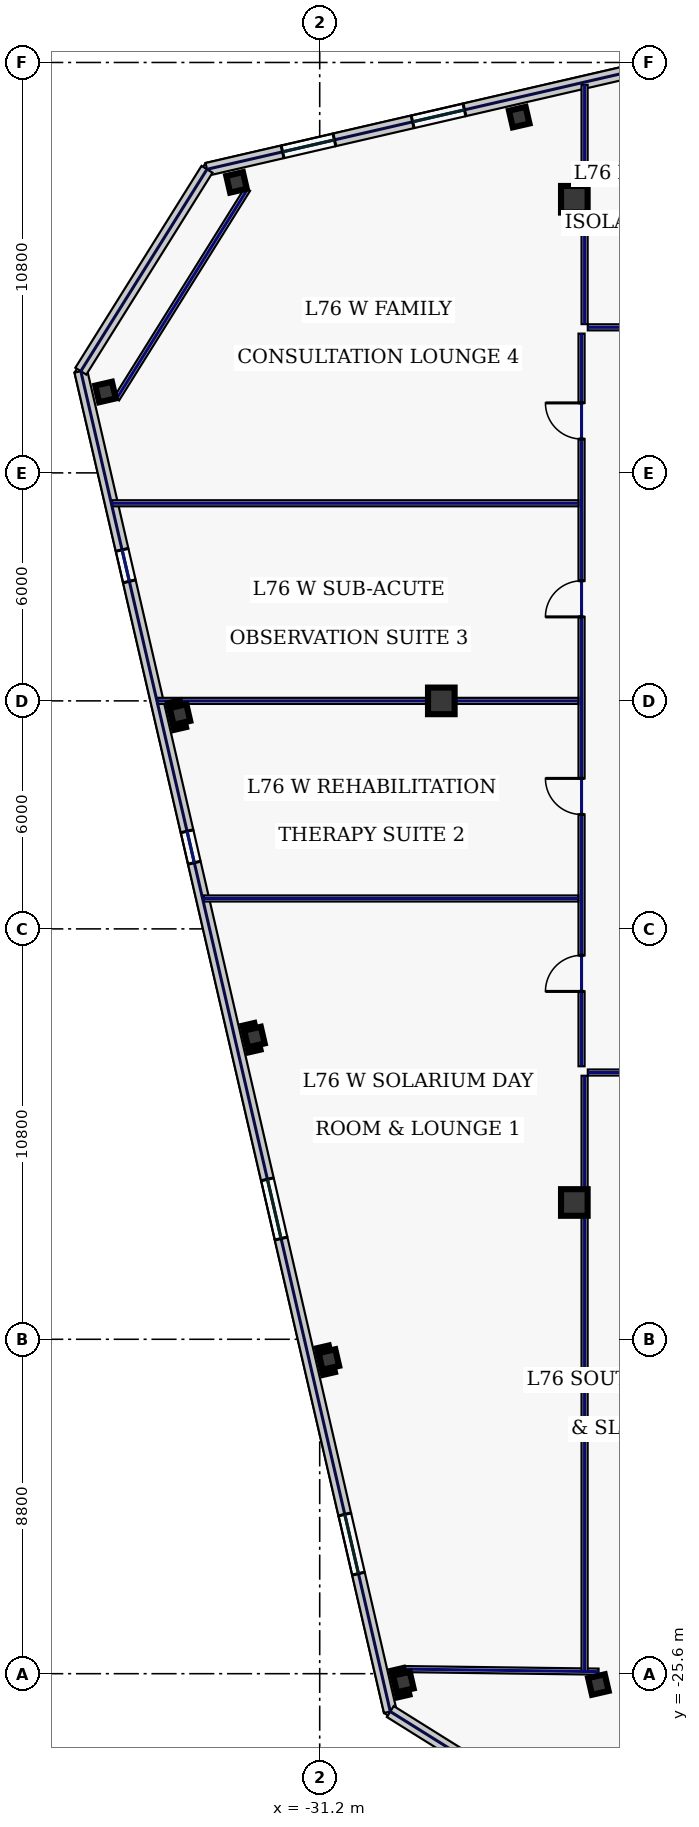
"""IFC4 building model, lengths in metres.
Left out: names, types, materials, properties, quantities, classifications, styles, units other than length and angle.
Written with IfcOpenShell. Run it as: python <this file> out.ifc"""

import sys

from ifc_helpers import new_model, si_unit, direction, frame, frame_2d, origin, origin_2d, place, context, subcontext, project, spatial, rectangle, hollow_rectangle, extrude, element, fill, save


model = new_model("IFC4")
c1 = context("Model", 3, precision=1e-05, world=origin(), true_north=direction((0.0, 1.0)))
c2 = subcontext(c1, "Body", "Model", "MODEL_VIEW")
j1 = project(units=[si_unit("LENGTHUNIT", "METRE"), si_unit("PLANEANGLEUNIT", "RADIAN")], contexts=[c1])
p1 = place(None, origin())
s1 = spatial("IfcSite", under=j1, at=p1, CompositionType="ELEMENT")
p2 = place(p1, origin())
s2 = spatial("IfcBuilding", under=s1, at=p2, CompositionType="ELEMENT")
p3 = place(p2, frame((0.0, 0.0, 325.0)))
s3 = spatial("IfcBuildingStorey", under=s2, at=p3, CompositionType="ELEMENT", Elevation=325.0)
for number, where, z_axis, x_axis in (
    (1, (-24.5, -13.2, 0.0), (0.0, 0.0, 1.0), (1.0, 0.0, 0.0)),
    (2, (-24.5, 13.2, 0.0), (0.0, 0.0, 1.0), (1.0, 0.0, 0.0)),
    (3, (-28.0, 0.0, 0.0), (0.0, 0.0, 1.0), (1.0, 0.0, 0.0)),
):
    element("IfcColumn", number, at=place(p3, frame(where, z_axis=z_axis, x_axis=x_axis)), inside=s3, PredefinedType="COLUMN", context=c2, shape_type="SweptSolid", body=[
        extrude(hollow_rectangle(XDim=0.7, YDim=0.7, WallThickness=0.032, at=origin_2d()), origin(), (0.0, 0.0, 1.0), 3.74),
    ])
for number, where, z_axis, x_axis in (
    (4, (-23.867, -25.886, 0.0), (0.0, 0.0, 1.0), (0.974, 0.225, 0.0)),
    (5, (-25.95, 15.362, 0.0), (0.0, 0.0, 1.0), (0.974, 0.225, 0.0)),
    (6, (-33.389, 13.645, 0.0), (0.0, 0.0, 1.0), (0.974, 0.225, 0.0)),
    (7, (-36.836, 8.128, 0.0), (0.0, 0.0, 1.0), (0.974, 0.225, 0.0)),
    (8, (-34.877, -0.359, 0.0), (0.0, 0.0, 1.0), (0.974, 0.225, 0.0)),
    (9, (-32.917, -8.845, 0.0), (0.0, 0.0, 1.0), (0.974, 0.225, 0.0)),
    (10, (-30.958, -17.332, 0.0), (0.0, 0.0, 1.0), (0.974, 0.225, 0.0)),
    (11, (-28.999, -25.819, 0.0), (0.0, 0.0, 1.0), (0.974, 0.225, 0.0)),
):
    element("IfcColumn", number, at=place(p3, frame(where, z_axis=z_axis, x_axis=x_axis)), inside=s3, PredefinedType="COLUMN", context=c2, shape_type="SweptSolid", body=[
        extrude(hollow_rectangle(XDim=0.45, YDim=0.45, WallThickness=0.022, at=origin_2d()), origin(), (0.0, 0.0, 1.0), 3.74),
    ])
p4 = place(p3, frame((-24.03, -29.916, 0.0), z_axis=(0.0, 0.0, 1.0), x_axis=(0.974370978061, 0.224947098473, 0.0)))
e12 = element("IfcWall", 12, at=p4, inside=s3, PredefinedType="STANDARD", context=c2, shape_type="SweptSolid", body=[
    extrude(rectangle(XDim=17.506, YDim=0.34, at=frame_2d((8.753, 0.0))), origin(), (0.0, 0.0, 1.0), 3.74),
])
p5 = place(p4, frame((2.35, 0.0, 0.9)))
e13 = element("IfcOpeningElement", 13, at=p5, cuts=e12, PredefinedType="OPENING", context=c2, shape_type="SweptSolid", body=[
    extrude(rectangle(XDim=1.5, YDim=2.0, at=frame_2d((0.75, 1.0))), frame((0.0, 0.18, 0.0), z_axis=(0.0, -1.0, 0.0), x_axis=(1.0, 0.0, 0.0)), (0.0, 0.0, 1.0), 0.36),
])
p6 = place(p4, frame((5.817, 0.0, 0.9)))
e14 = element("IfcOpeningElement", 14, at=p6, cuts=e12, PredefinedType="OPENING", context=c2, shape_type="SweptSolid", body=[
    extrude(rectangle(XDim=1.5, YDim=2.0, at=frame_2d((0.75, 1.0))), frame((0.0, 0.18, 0.0), z_axis=(0.0, -1.0, 0.0), x_axis=(1.0, 0.0, 0.0)), (0.0, 0.0, 1.0), 0.36),
])
p7 = place(p4, frame((9.886, 0.0, 0.9)))
e15 = element("IfcOpeningElement", 15, at=p7, cuts=e12, PredefinedType="OPENING", context=c2, shape_type="SweptSolid", body=[
    extrude(rectangle(XDim=1.5, YDim=2.0, at=frame_2d((0.75, 1.0))), frame((0.0, 0.18, 0.0), z_axis=(0.0, -1.0, 0.0), x_axis=(1.0, 0.0, 0.0)), (0.0, 0.0, 1.0), 0.36),
])
p8 = place(p4, frame((13.353, 0.0, 0.9)))
e16 = element("IfcOpeningElement", 16, at=p8, cuts=e12, PredefinedType="OPENING", context=c2, shape_type="SweptSolid", body=[
    extrude(rectangle(XDim=1.5, YDim=2.0, at=frame_2d((0.75, 1.0))), frame((0.0, 0.18, 0.0), z_axis=(0.0, -1.0, 0.0), x_axis=(1.0, 0.0, 0.0)), (0.0, 0.0, 1.0), 0.36),
])
p9 = place(p3, frame((-17.245, 17.895, 0.0), z_axis=(0.0, 0.0, 1.0), x_axis=(-0.97437318493, -0.224937539085, 0.0)))
e17 = element("IfcWall", 17, at=p9, inside=s3, PredefinedType="STANDARD", context=c2, shape_type="SweptSolid", body=[
    extrude(rectangle(XDim=17.366, YDim=0.34, at=frame_2d((8.683, 0.0))), origin(), (0.0, 0.0, 1.0), 3.74),
])
p10 = place(p9, frame((13.925, 0.0, 1.0)))
e18 = element("IfcOpeningElement", 18, at=p10, cuts=e17, PredefinedType="OPENING", context=c2, shape_type="SweptSolid", body=[
    extrude(rectangle(XDim=1.4, YDim=1.85, at=frame_2d((0.7, 0.925))), frame((0.0, 0.18, 0.0), z_axis=(0.0, -1.0, 0.0), x_axis=(1.0, 0.0, 0.0)), (0.0, 0.0, 1.0), 0.36),
])
p11 = place(p9, frame((10.413, 0.0, 1.0)))
e19 = element("IfcOpeningElement", 19, at=p11, cuts=e17, PredefinedType="OPENING", context=c2, shape_type="SweptSolid", body=[
    extrude(rectangle(XDim=1.4, YDim=1.85, at=frame_2d((0.7, 0.925))), frame((0.0, 0.18, 0.0), z_axis=(0.0, -1.0, 0.0), x_axis=(1.0, 0.0, 0.0)), (0.0, 0.0, 1.0), 0.36),
])
p12 = place(p9, frame((3.329, 0.0, 1.0)))
e20 = element("IfcOpeningElement", 20, at=p12, cuts=e17, PredefinedType="OPENING", context=c2, shape_type="SweptSolid", body=[
    extrude(rectangle(XDim=0.85, YDim=1.85, at=frame_2d((0.425, 0.925))), frame((0.0, 0.18, 0.0), z_axis=(0.0, -1.0, 0.0), x_axis=(1.0, 0.0, 0.0)), (0.0, 0.0, 1.0), 0.36),
])
p13 = place(p3, frame((-37.486, 8.676, 0.0), z_axis=(0.0, 0.0, 1.0), x_axis=(0.224953091034, -0.974369594576, 0.0)))
e21 = element("IfcWall", 21, at=p13, inside=s3, PredefinedType="STANDARD", context=c2, shape_type="SweptSolid", body=[
    extrude(rectangle(XDim=36.2, YDim=0.34, at=frame_2d((18.1, 0.0))), origin(), (0.0, 0.0, 1.0), 3.74),
])
p14 = place(p13, frame((4.825, 0.0, 0.75)))
e22 = element("IfcOpeningElement", 22, at=p14, cuts=e21, PredefinedType="OPENING", context=c2, shape_type="SweptSolid", body=[
    extrude(rectangle(XDim=0.85, YDim=1.85, at=frame_2d((0.425, 0.925))), frame((0.0, 0.18, 0.0), z_axis=(0.0, -1.0, 0.0), x_axis=(1.0, 0.0, 0.0)), (0.0, 0.0, 1.0), 0.36),
])
p15 = place(p13, frame((12.425, 0.0, 0.75)))
e23 = element("IfcOpeningElement", 23, at=p15, cuts=e21, PredefinedType="OPENING", context=c2, shape_type="SweptSolid", body=[
    extrude(rectangle(XDim=0.85, YDim=1.85, at=frame_2d((0.425, 0.925))), frame((0.0, 0.18, 0.0), z_axis=(0.0, -1.0, 0.0), x_axis=(1.0, 0.0, 0.0)), (0.0, 0.0, 1.0), 0.36),
])
p16 = place(p13, frame((21.825, 0.0, 0.58)))
e24 = element("IfcOpeningElement", 24, at=p16, cuts=e21, PredefinedType="OPENING", context=c2, shape_type="SweptSolid", body=[
    extrude(rectangle(XDim=1.6, YDim=2.3, at=frame_2d((0.8, 1.15))), frame((0.0, 0.18, 0.0), z_axis=(0.0, -1.0, 0.0), x_axis=(1.0, 0.0, 0.0)), (0.0, 0.0, 1.0), 0.36),
])
p17 = place(p13, frame((30.875, 0.0, 0.58)))
e25 = element("IfcOpeningElement", 25, at=p17, cuts=e21, PredefinedType="OPENING", context=c2, shape_type="SweptSolid", body=[
    extrude(rectangle(XDim=1.6, YDim=2.3, at=frame_2d((0.8, 1.15))), frame((0.0, 0.18, 0.0), z_axis=(0.0, -1.0, 0.0), x_axis=(1.0, 0.0, 0.0)), (0.0, 0.0, 1.0), 0.36),
])
for number, where, z_axis, x_axis in (
    (26, (-34.166, 13.989, 0.0), (0.0, 0.0, 1.0), (-0.53, -0.848, 0.0)),
    (27, (-29.343, -26.596, 0.0), (0.0, 0.0, 1.0), (0.848, -0.53, 0.0)),
):
    element("IfcWall", number, at=place(p3, frame(where, z_axis=z_axis, x_axis=x_axis)), inside=s3, PredefinedType="STANDARD", context=c2, shape_type="SweptSolid", body=[
        extrude(rectangle(XDim=6.265, YDim=0.34, at=frame_2d((3.133, 0.0))), origin(), (0.0, 0.0, 1.0), 3.74),
    ])
p18 = place(p3, frame((-33.1, 13.465, 0.0), z_axis=(0.0, 0.0, 1.0), x_axis=(-0.529958457806, -0.848023604035, 0.0)))
e28 = element("IfcWall", 28, at=p18, inside=s3, PredefinedType="PARTITIONING", context=c2, shape_type="SweptSolid", body=[
    extrude(rectangle(XDim=6.505, YDim=0.16, at=frame_2d((3.252, 0.0))), origin(), (0.0, 0.0, 1.0), 3.74),
])
p19 = place(p3, frame((-28.994, -25.479, 0.0), z_axis=(0.0, 0.0, 1.0), x_axis=(0.999915052546, -0.01303409726, 0.0)))
e29 = element("IfcWall", 29, at=p19, inside=s3, PredefinedType="PARTITIONING", context=c2, shape_type="SweptSolid", body=[
    extrude(rectangle(XDim=5.132, YDim=0.16, at=frame_2d((2.566, 0.0))), origin(), (0.0, 0.0, 1.0), 3.74),
])
p20 = place(p3, frame((-24.31, -9.615, 0.0), z_axis=(0.0, 0.0, 1.0), x_axis=(0.0, 1.0, 0.0)))
e30 = element("IfcWall", 30, at=p20, inside=s3, PredefinedType="PARTITIONING", context=c2, shape_type="SweptSolid", body=[
    extrude(rectangle(XDim=19.28, YDim=0.16, at=frame_2d((9.64, 0.0))), origin(), (0.0, 0.0, 1.0), 3.74),
])
p21 = place(p20, frame((1.969, 0.0, 0.0)))
e31 = element("IfcOpeningElement", 31, at=p21, cuts=e30, PredefinedType="OPENING", context=c2, shape_type="SweptSolid", body=[
    extrude(rectangle(XDim=0.95, YDim=2.2, at=frame_2d((0.475, 1.1))), frame((0.0, 0.09, 0.0), z_axis=(0.0, -1.0, 0.0), x_axis=(1.0, 0.0, 0.0)), (0.0, 0.0, 1.0), 0.18),
])
p22 = place(p20, frame((6.625, 0.0, 0.0)))
e32 = element("IfcOpeningElement", 32, at=p22, cuts=e30, PredefinedType="OPENING", context=c2, shape_type="SweptSolid", body=[
    extrude(rectangle(XDim=0.95, YDim=2.2, at=frame_2d((0.475, 1.1))), frame((0.0, 0.09, 0.0), z_axis=(0.0, -1.0, 0.0), x_axis=(1.0, 0.0, 0.0)), (0.0, 0.0, 1.0), 0.18),
])
p23 = place(p20, frame((11.825, 0.0, 0.0)))
e33 = element("IfcOpeningElement", 33, at=p23, cuts=e30, PredefinedType="OPENING", context=c2, shape_type="SweptSolid", body=[
    extrude(rectangle(XDim=0.95, YDim=2.2, at=frame_2d((0.475, 1.1))), frame((0.0, 0.09, 0.0), z_axis=(0.0, -1.0, 0.0), x_axis=(1.0, 0.0, 0.0)), (0.0, 0.0, 1.0), 0.18),
])
p24 = place(p20, frame((16.506, 0.0, 0.0)))
e34 = element("IfcOpeningElement", 34, at=p24, cuts=e30, PredefinedType="OPENING", context=c2, shape_type="SweptSolid", body=[
    extrude(rectangle(XDim=0.95, YDim=2.2, at=frame_2d((0.475, 1.1))), frame((0.0, 0.09, 0.0), z_axis=(0.0, -1.0, 0.0), x_axis=(1.0, 0.0, 0.0)), (0.0, 0.0, 1.0), 0.18),
])
p25 = place(p3, frame((-24.145, 9.83, 0.0), z_axis=(0.0, 0.0, 1.0), x_axis=(1.0, 0.0, 0.0)))
e35 = element("IfcWall", 35, at=p25, inside=s3, PredefinedType="PARTITIONING", context=c2, shape_type="SweptSolid", body=[
    extrude(rectangle(XDim=48.29, YDim=0.16, at=frame_2d((24.145, 0.0))), origin(), (0.0, 0.0, 1.0), 3.74),
])
p26 = place(p25, frame((1.869, 0.0, 0.0)))
e36 = element("IfcOpeningElement", 36, at=p26, cuts=e35, PredefinedType="OPENING", context=c2, shape_type="SweptSolid", body=[
    extrude(rectangle(XDim=1.3, YDim=2.2, at=frame_2d((0.65, 1.1))), frame((0.0, 0.09, 0.0), z_axis=(0.0, -1.0, 0.0), x_axis=(1.0, 0.0, 0.0)), (0.0, 0.0, 1.0), 0.18),
])
p27 = place(p25, frame((6.24, 0.0, 0.0)))
e37 = element("IfcOpeningElement", 37, at=p27, cuts=e35, PredefinedType="OPENING", context=c2, shape_type="SweptSolid", body=[
    extrude(rectangle(XDim=1.3, YDim=2.2, at=frame_2d((0.65, 1.1))), frame((0.0, 0.09, 0.0), z_axis=(0.0, -1.0, 0.0), x_axis=(1.0, 0.0, 0.0)), (0.0, 0.0, 1.0), 0.18),
])
p28 = place(p25, frame((12.405, 0.0, 0.0)))
e38 = element("IfcOpeningElement", 38, at=p28, cuts=e35, PredefinedType="OPENING", context=c2, shape_type="SweptSolid", body=[
    extrude(rectangle(XDim=0.95, YDim=2.2, at=frame_2d((0.475, 1.1))), frame((0.0, 0.09, 0.0), z_axis=(0.0, -1.0, 0.0), x_axis=(1.0, 0.0, 0.0)), (0.0, 0.0, 1.0), 0.18),
])
p29 = place(p25, frame((20.28, 0.0, 0.0)))
e39 = element("IfcOpeningElement", 39, at=p29, cuts=e35, PredefinedType="OPENING", context=c2, shape_type="SweptSolid", body=[
    extrude(rectangle(XDim=1.3, YDim=2.2, at=frame_2d((0.65, 1.1))), frame((0.0, 0.09, 0.0), z_axis=(0.0, -1.0, 0.0), x_axis=(1.0, 0.0, 0.0)), (0.0, 0.0, 1.0), 0.18),
])
p30 = place(p25, frame((29.055, 0.0, 0.0)))
e40 = element("IfcOpeningElement", 40, at=p30, cuts=e35, PredefinedType="OPENING", context=c2, shape_type="SweptSolid", body=[
    extrude(rectangle(XDim=1.05, YDim=2.2, at=frame_2d((0.525, 1.1))), frame((0.0, 0.09, 0.0), z_axis=(0.0, -1.0, 0.0), x_axis=(1.0, 0.0, 0.0)), (0.0, 0.0, 1.0), 0.18),
])
p31 = place(p25, frame((37.605, 0.0, 0.0)))
e41 = element("IfcOpeningElement", 41, at=p31, cuts=e35, PredefinedType="OPENING", context=c2, shape_type="SweptSolid", body=[
    extrude(rectangle(XDim=0.95, YDim=2.2, at=frame_2d((0.475, 1.1))), frame((0.0, 0.09, 0.0), z_axis=(0.0, -1.0, 0.0), x_axis=(1.0, 0.0, 0.0)), (0.0, 0.0, 1.0), 0.18),
])
p32 = place(p25, frame((44.726, 0.0, 0.0)))
e42 = element("IfcOpeningElement", 42, at=p32, cuts=e35, PredefinedType="OPENING", context=c2, shape_type="SweptSolid", body=[
    extrude(rectangle(XDim=0.95, YDim=2.2, at=frame_2d((0.475, 1.1))), frame((0.0, 0.09, 0.0), z_axis=(0.0, -1.0, 0.0), x_axis=(1.0, 0.0, 0.0)), (0.0, 0.0, 1.0), 0.18),
])
p33 = place(p3, frame((12.535, -9.78, 0.0), z_axis=(0.0, 0.0, 1.0), x_axis=(-1.0, 0.0, 0.0)))
e43 = element("IfcWall", 43, at=p33, inside=s3, PredefinedType="PARTITIONING", context=c2, shape_type="SweptSolid", body=[
    extrude(rectangle(XDim=36.68, YDim=0.16, at=frame_2d((18.34, 0.0))), origin(), (0.0, 0.0, 1.0), 3.74),
])
p34 = place(p33, frame((33.856, 0.0, 0.0)))
e44 = element("IfcOpeningElement", 44, at=p34, cuts=e43, PredefinedType="OPENING", context=c2, shape_type="SweptSolid", body=[
    extrude(rectangle(XDim=1.15, YDim=2.2, at=frame_2d((0.575, 1.1))), frame((0.0, 0.09, 0.0), z_axis=(0.0, -1.0, 0.0), x_axis=(1.0, 0.0, 0.0)), (0.0, 0.0, 1.0), 0.18),
])
p35 = place(p33, frame((29.535, 0.0, 0.0)))
e45 = element("IfcOpeningElement", 45, at=p35, cuts=e43, PredefinedType="OPENING", context=c2, shape_type="SweptSolid", body=[
    extrude(rectangle(XDim=0.95, YDim=2.2, at=frame_2d((0.475, 1.1))), frame((0.0, 0.09, 0.0), z_axis=(0.0, -1.0, 0.0), x_axis=(1.0, 0.0, 0.0)), (0.0, 0.0, 1.0), 0.18),
])
p36 = place(p33, frame((23.555, 0.0, 0.0)))
e46 = element("IfcOpeningElement", 46, at=p36, cuts=e43, PredefinedType="OPENING", context=c2, shape_type="SweptSolid", body=[
    extrude(rectangle(XDim=1.05, YDim=2.2, at=frame_2d((0.525, 1.1))), frame((0.0, 0.09, 0.0), z_axis=(0.0, -1.0, 0.0), x_axis=(1.0, 0.0, 0.0)), (0.0, 0.0, 1.0), 0.18),
])
p37 = place(p33, frame((16.425, 0.0, 0.0)))
e47 = element("IfcOpeningElement", 47, at=p37, cuts=e43, PredefinedType="OPENING", context=c2, shape_type="SweptSolid", body=[
    extrude(rectangle(XDim=0.95, YDim=2.2, at=frame_2d((0.475, 1.1))), frame((0.0, 0.09, 0.0), z_axis=(0.0, -1.0, 0.0), x_axis=(1.0, 0.0, 0.0)), (0.0, 0.0, 1.0), 0.18),
])
p38 = place(p33, frame((9.385, 0.0, 0.0)))
e48 = element("IfcOpeningElement", 48, at=p38, cuts=e43, PredefinedType="OPENING", context=c2, shape_type="SweptSolid", body=[
    extrude(rectangle(XDim=0.95, YDim=2.2, at=frame_2d((0.475, 1.1))), frame((0.0, 0.09, 0.0), z_axis=(0.0, -1.0, 0.0), x_axis=(1.0, 0.0, 0.0)), (0.0, 0.0, 1.0), 0.18),
])
p39 = place(p33, frame((2.624, 0.0, 0.0)))
e49 = element("IfcOpeningElement", 49, at=p39, cuts=e43, PredefinedType="OPENING", context=c2, shape_type="SweptSolid", body=[
    extrude(rectangle(XDim=1.3, YDim=2.2, at=frame_2d((0.65, 1.1))), frame((0.0, 0.09, 0.0), z_axis=(0.0, -1.0, 0.0), x_axis=(1.0, 0.0, 0.0)), (0.0, 0.0, 1.0), 0.18),
])
p40 = place(p3, frame((-24.23, 9.915, 0.0), z_axis=(0.0, 0.0, 1.0), x_axis=(0.0, 1.0, 0.0)))
e50 = element("IfcWall", 50, at=p40, inside=s3, PredefinedType="PARTITIONING", context=c2, shape_type="SweptSolid", body=[
    extrude(rectangle(XDim=6.296, YDim=0.16, at=frame_2d((3.148, 0.0))), origin(), (0.0, 0.0, 1.0), 3.74),
])
p41 = place(p3, frame((-24.23, -25.536, 0.0), z_axis=(0.0, 0.0, 1.0), x_axis=(0.0, 1.0, 0.0)))
e51 = element("IfcWall", 51, at=p41, inside=s3, PredefinedType="PARTITIONING", context=c2, shape_type="SweptSolid", body=[
    extrude(rectangle(XDim=15.671, YDim=0.16, at=frame_2d((7.835, 0.0))), origin(), (0.0, 0.0, 1.0), 3.335),
])
p42 = place(p3, frame((-34.262, -5.2, 0.0), z_axis=(0.0, 0.0, 1.0), x_axis=(1.0, 0.0, 0.0)))
e52 = element("IfcWall", 52, at=p42, inside=s3, PredefinedType="PARTITIONING", context=c2, shape_type="SweptSolid", body=[
    extrude(rectangle(XDim=9.867, YDim=0.16, at=frame_2d((4.933, 0.0))), origin(), (0.0, 0.0, 1.0), 3.74),
])
p43 = place(p3, frame((-35.462, 0.0, 0.0), z_axis=(0.0, 0.0, 1.0), x_axis=(1.0, 0.0, 0.0)))
e53 = element("IfcWall", 53, at=p43, inside=s3, PredefinedType="PARTITIONING", context=c2, shape_type="SweptSolid", body=[
    extrude(rectangle(XDim=11.067, YDim=0.16, at=frame_2d((5.534, 0.0))), origin(), (0.0, 0.0, 1.0), 3.335),
])
p44 = place(p3, frame((-36.663, 5.2, 0.0), z_axis=(0.0, 0.0, 1.0), x_axis=(1.0, 0.0, 0.0)))
e54 = element("IfcWall", 54, at=p44, inside=s3, PredefinedType="PARTITIONING", context=c2, shape_type="SweptSolid", body=[
    extrude(rectangle(XDim=12.268, YDim=0.16, at=frame_2d((6.134, 0.0))), origin(), (0.0, 0.0, 1.0), 3.74),
])
p45 = place(p10, origin())
e55 = element("IfcWindow", 55, at=p45, inside=s3, PartitioningType="SINGLE_PANEL", PredefinedType="WINDOW", context=c2, shape_type="SweptSolid", body=[
    extrude(rectangle(XDim=1.4, YDim=1.85, at=frame_2d((0.7, 0.925))), frame((0.0, 0.03, 0.0), z_axis=(0.0, -1.0, 0.0), x_axis=(1.0, 0.0, 0.0)), (0.0, 0.0, 1.0), 0.06),
])
fill(e18, e55)
p46 = place(p11, origin())
e56 = element("IfcWindow", 56, at=p46, inside=s3, PartitioningType="SINGLE_PANEL", PredefinedType="WINDOW", context=c2, shape_type="SweptSolid", body=[
    extrude(rectangle(XDim=1.4, YDim=1.85, at=frame_2d((0.7, 0.925))), frame((0.0, 0.03, 0.0), z_axis=(0.0, -1.0, 0.0), x_axis=(1.0, 0.0, 0.0)), (0.0, 0.0, 1.0), 0.06),
])
fill(e19, e56)
p47 = place(p14, origin())
e57 = element("IfcWindow", 57, at=p47, inside=s3, PartitioningType="SINGLE_PANEL", PredefinedType="WINDOW", context=c2, shape_type="SweptSolid", body=[
    extrude(rectangle(XDim=0.85, YDim=1.85, at=frame_2d((0.425, 0.925))), frame((0.0, 0.03, 0.0), z_axis=(0.0, -1.0, 0.0), x_axis=(1.0, 0.0, 0.0)), (0.0, 0.0, 1.0), 0.06),
])
fill(e22, e57)
p48 = place(p15, origin())
e58 = element("IfcWindow", 58, at=p48, inside=s3, PartitioningType="SINGLE_PANEL", PredefinedType="WINDOW", context=c2, shape_type="SweptSolid", body=[
    extrude(rectangle(XDim=0.85, YDim=1.85, at=frame_2d((0.425, 0.925))), frame((0.0, 0.03, 0.0), z_axis=(0.0, -1.0, 0.0), x_axis=(1.0, 0.0, 0.0)), (0.0, 0.0, 1.0), 0.06),
])
fill(e23, e58)
p49 = place(p16, origin())
e59 = element("IfcWindow", 59, at=p49, inside=s3, PartitioningType="SINGLE_PANEL", PredefinedType="WINDOW", context=c2, shape_type="SweptSolid", body=[
    extrude(rectangle(XDim=1.6, YDim=2.3, at=frame_2d((0.8, 1.15))), frame((0.0, 0.03, 0.0), z_axis=(0.0, -1.0, 0.0), x_axis=(1.0, 0.0, 0.0)), (0.0, 0.0, 1.0), 0.06),
])
fill(e24, e59)
p50 = place(p17, origin())
e60 = element("IfcWindow", 60, at=p50, inside=s3, PartitioningType="SINGLE_PANEL", PredefinedType="WINDOW", context=c2, shape_type="SweptSolid", body=[
    extrude(rectangle(XDim=1.6, YDim=2.3, at=frame_2d((0.8, 1.15))), frame((0.0, 0.03, 0.0), z_axis=(0.0, -1.0, 0.0), x_axis=(1.0, 0.0, 0.0)), (0.0, 0.0, 1.0), 0.06),
])
fill(e25, e60)
p51 = place(p21, origin())
e61 = element("IfcDoor", 61, at=p51, inside=s3, OperationType="SINGLE_SWING_LEFT", PredefinedType="DOOR", context=c2, shape_type="SweptSolid", body=[
    extrude(rectangle(XDim=0.95, YDim=2.2, at=frame_2d((0.475, 1.1))), frame((0.0, 0.025, 0.0), z_axis=(0.0, -1.0, 0.0), x_axis=(1.0, 0.0, 0.0)), (0.0, 0.0, 1.0), 0.05),
])
fill(e31, e61)
p52 = place(p22, origin())
e62 = element("IfcDoor", 62, at=p52, inside=s3, OperationType="SINGLE_SWING_RIGHT", PredefinedType="DOOR", context=c2, shape_type="SweptSolid", body=[
    extrude(rectangle(XDim=0.95, YDim=2.2, at=frame_2d((0.475, 1.1))), frame((0.0, 0.025, 0.0), z_axis=(0.0, -1.0, 0.0), x_axis=(1.0, 0.0, 0.0)), (0.0, 0.0, 1.0), 0.05),
])
fill(e32, e62)
p53 = place(p23, origin())
e63 = element("IfcDoor", 63, at=p53, inside=s3, OperationType="SINGLE_SWING_LEFT", PredefinedType="DOOR", context=c2, shape_type="SweptSolid", body=[
    extrude(rectangle(XDim=0.95, YDim=2.2, at=frame_2d((0.475, 1.1))), frame((0.0, 0.025, 0.0), z_axis=(0.0, -1.0, 0.0), x_axis=(1.0, 0.0, 0.0)), (0.0, 0.0, 1.0), 0.05),
])
fill(e33, e63)
p54 = place(p24, origin())
e64 = element("IfcDoor", 64, at=p54, inside=s3, OperationType="SINGLE_SWING_RIGHT", PredefinedType="DOOR", context=c2, shape_type="SweptSolid", body=[
    extrude(rectangle(XDim=0.95, YDim=2.2, at=frame_2d((0.475, 1.1))), frame((0.0, 0.025, 0.0), z_axis=(0.0, -1.0, 0.0), x_axis=(1.0, 0.0, 0.0)), (0.0, 0.0, 1.0), 0.05),
])
fill(e34, e64)
save(model, sys.argv[1])
